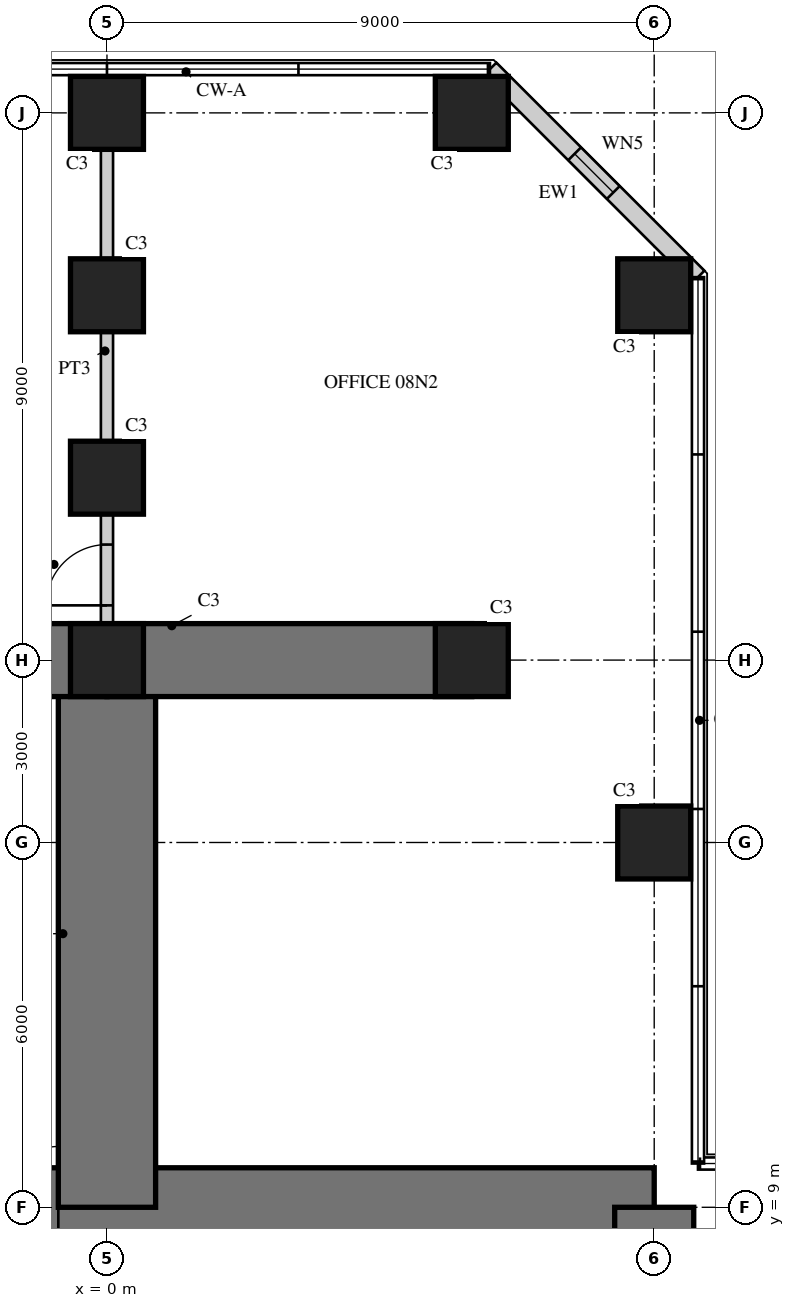
"""IFC4 building model, lengths in metres.
Left out: names, types, materials, properties, quantities, classifications, styles, units other than length and angle.
Written with IfcOpenShell. Run it as: python <this file> out.ifc"""

import sys

from ifc_helpers import new_model, si_unit, direction, frame, frame_2d, origin, origin_2d, place, context, subcontext, project, spatial, rectangle, hollow_rectangle, extrude, element, fill, save


model = new_model("IFC4")
c1 = context("Model", 3, precision=1e-05, world=origin(), true_north=direction((0.0, 1.0)))
c2 = subcontext(c1, "Body", "Model", "MODEL_VIEW")
j1 = project(units=[si_unit("LENGTHUNIT", "METRE"), si_unit("PLANEANGLEUNIT", "RADIAN")], contexts=[c1])
p1 = place(None, origin())
s1 = spatial("IfcSite", under=j1, at=p1, CompositionType="ELEMENT")
p2 = place(p1, origin())
s2 = spatial("IfcBuilding", under=s1, at=p2, CompositionType="ELEMENT")
p3 = place(p2, frame((0.0, 0.0, 35.5)))
s3 = spatial("IfcBuildingStorey", under=s2, at=p3, CompositionType="ELEMENT", Elevation=35.5)
p4 = place(p3, frame((9.0, 9.0, 0.0), z_axis=(0.0, 0.0, 1.0), x_axis=(-1.0, 0.0, 0.0)))
e1 = element("IfcWall", 1, at=p4, inside=s3, PredefinedType="SHEAR", context=c2, shape_type="SweptSolid", body=[
    extrude(rectangle(XDim=18.0, YDim=1.3, at=frame_2d((9.0, 0.0))), origin(), (0.0, 0.0, 1.0), 4.0),
])
p5 = place(p4, frame((9.8, 0.0, 0.0)))
e2 = element("IfcOpeningElement", 2, at=p5, cuts=e1, PredefinedType="OPENING", context=c2, shape_type="SweptSolid", body=[
    extrude(rectangle(XDim=1.0, YDim=2.4, at=frame_2d((0.5, 1.2))), frame((0.0, 0.66, 0.0), z_axis=(0.0, -1.0, 0.0), x_axis=(1.0, 0.0, 0.0)), (0.0, 0.0, 1.0), 1.32),
])
p6 = place(p3, frame((9.0, -9.0, 0.0), z_axis=(0.0, 0.0, 1.0), x_axis=(0.0, 1.0, 0.0)))
e3 = element("IfcWall", 3, at=p6, inside=s3, PredefinedType="SHEAR", context=c2, shape_type="SweptSolid", body=[
    extrude(rectangle(XDim=18.0, YDim=1.3, at=frame_2d((9.0, 0.0))), origin(), (0.0, 0.0, 1.0), 4.0),
])
p7 = place(p6, frame((9.8, 0.0, 0.0)))
e4 = element("IfcOpeningElement", 4, at=p7, cuts=e3, PredefinedType="OPENING", context=c2, shape_type="SweptSolid", body=[
    extrude(rectangle(XDim=1.0, YDim=2.4, at=frame_2d((0.5, 1.2))), frame((0.0, 0.66, 0.0), z_axis=(0.0, -1.0, 0.0), x_axis=(1.0, 0.0, 0.0)), (0.0, 0.0, 1.0), 1.32),
])
p8 = place(p3, frame((0.0, 9.0, 0.0), z_axis=(0.0, 0.0, 1.0), x_axis=(0.0, 1.0, 0.0)))
e5 = element("IfcWall", 5, at=p8, inside=s3, PredefinedType="SHEAR", context=c2, shape_type="SweptSolid", body=[
    extrude(rectangle(XDim=9.0, YDim=1.6, at=frame_2d((4.5, 0.0))), origin(), (0.0, 0.0, 1.0), 4.0),
])
for number, where, z_axis, x_axis in (
    (6, (0.0, 18.0, 0.0), (0.0, 0.0, 1.0), (-1.0, 0.0, 0.0)),
    (7, (0.0, 18.0, 0.0), (0.0, 0.0, 1.0), (1.0, 0.0, 0.0)),
):
    element("IfcWall", number, at=place(p3, frame(where, z_axis=z_axis, x_axis=x_axis)), inside=s3, PredefinedType="SHEAR", context=c2, shape_type="SweptSolid", body=[
        extrude(rectangle(XDim=6.0, YDim=1.2, at=frame_2d((3.0, 0.0))), origin(), (0.0, 0.0, 1.0), 4.0),
    ])
for number, where, z_axis, x_axis in (
    (8, (9.0, 15.0, 0.0), (0.0, 0.0, 1.0), (1.0, 0.0, 0.0)),
    (9, (9.0, 24.0, 0.0), (0.0, 0.0, 1.0), (1.0, 0.0, 0.0)),
    (10, (6.0, 27.0, 0.0), (0.0, 0.0, 1.0), (1.0, 0.0, 0.0)),
    (11, (0.0, 27.0, 0.0), (0.0, 0.0, 1.0), (1.0, 0.0, 0.0)),
    (12, (6.0, 18.0, 0.0), (0.0, 0.0, 1.0), (1.0, 0.0, 0.0)),
    (13, (0.0, 18.0, 0.0), (0.0, 0.0, 1.0), (1.0, 0.0, 0.0)),
    (14, (0.0, 21.0, 0.0), (0.0, 0.0, 1.0), (1.0, 0.0, 0.0)),
    (15, (0.0, 24.0, 0.0), (0.0, 0.0, 1.0), (1.0, 0.0, 0.0)),
):
    element("IfcColumn", number, at=place(p3, frame(where, z_axis=z_axis, x_axis=x_axis)), inside=s3, PredefinedType="COLUMN", context=c2, shape_type="SweptSolid", body=[
        extrude(rectangle(XDim=1.2, YDim=1.2, at=origin_2d()), origin(), (0.0, 0.0, 1.0), 4.0),
    ])
p9 = place(p3, frame((9.72, 24.298, 0.0), z_axis=(0.0, 0.0, 1.0), x_axis=(-0.707106781187, 0.707106781187, 0.0)))
e16 = element("IfcWall", 16, at=p9, inside=s3, PredefinedType="SOLIDWALL", context=c2, shape_type="SweptSolid", body=[
    extrude(rectangle(XDim=4.839, YDim=0.3, at=frame_2d((2.419, 0.0))), origin(), (0.0, 0.0, 1.0), 3.8),
])
p10 = place(p9, frame((1.969, 0.0, 0.3)))
e17 = element("IfcOpeningElement", 17, at=p10, cuts=e16, PredefinedType="OPENING", context=c2, shape_type="SweptSolid", body=[
    extrude(rectangle(XDim=0.9, YDim=2.4, at=frame_2d((0.45, 1.2))), frame((0.0, 0.16, 0.0), z_axis=(0.0, -1.0, 0.0), x_axis=(1.0, 0.0, 0.0)), (0.0, 0.0, 1.0), 0.32),
])
p11 = place(p3, frame((0.0, 18.0, 0.0), z_axis=(0.0, 0.0, 1.0), x_axis=(0.0, 1.0, 0.0)))
e18 = element("IfcWall", 18, at=p11, inside=s3, PredefinedType="SOLIDWALL", context=c2, shape_type="SweptSolid", body=[
    extrude(rectangle(XDim=3.0, YDim=0.2, at=frame_2d((1.5, 0.0))), origin(), (0.0, 0.0, 1.0), 3.8),
])
p12 = place(p11, frame((0.9, 0.0, 0.0)))
e19 = element("IfcOpeningElement", 19, at=p12, cuts=e18, PredefinedType="OPENING", context=c2, shape_type="SweptSolid", body=[
    extrude(rectangle(XDim=1.0, YDim=2.2, at=frame_2d((0.5, 1.1))), frame((0.0, 0.11, 0.0), z_axis=(0.0, -1.0, 0.0), x_axis=(1.0, 0.0, 0.0)), (0.0, 0.0, 1.0), 0.22),
])
p13 = place(p3, frame((0.0, 21.0, 0.0), z_axis=(0.0, 0.0, 1.0), x_axis=(0.0, 1.0, 0.0)))
e20 = element("IfcWall", 20, at=p13, inside=s3, PredefinedType="SOLIDWALL", context=c2, shape_type="SweptSolid", body=[
    extrude(rectangle(XDim=6.0, YDim=0.2, at=frame_2d((3.0, 0.0))), origin(), (0.0, 0.0, 1.0), 2.9),
])
p14 = place(p10, origin())
e21 = element("IfcWindow", 21, at=p14, inside=s3, PartitioningType="SINGLE_PANEL", PredefinedType="WINDOW", context=c2, shape_type="SweptSolid", body=[
    extrude(hollow_rectangle(XDim=0.9, YDim=2.4, WallThickness=0.06, at=frame_2d((0.45, 1.2))), frame((0.0, 0.03, 0.0), z_axis=(0.0, -1.0, 0.0), x_axis=(1.0, 0.0, 0.0)), (0.0, 0.0, 1.0), 0.06),
    extrude(rectangle(XDim=0.779, YDim=2.279, at=frame_2d((0.45, 1.2))), frame((0.0, 0.03, 0.0), z_axis=(0.0, -1.0, 0.0), x_axis=(1.0, 0.0, 0.0)), (0.0, 0.0, 1.0), 0.06),
])
fill(e17, e21)
p15 = place(p12, origin())
e22 = element("IfcDoor", 22, at=p15, inside=s3, OperationType="SINGLE_SWING_LEFT", PredefinedType="DOOR", context=c2, shape_type="SweptSolid", body=[
    extrude(rectangle(XDim=1.0, YDim=2.2, at=frame_2d((0.5, 1.1))), frame((0.0, 0.025, 0.0), z_axis=(0.0, -1.0, 0.0), x_axis=(1.0, 0.0, 0.0)), (0.0, 0.0, 1.0), 0.05),
])
fill(e19, e22)
p16 = place(p5, frame((1.0, 0.0, 0.0), z_axis=(0.0, 0.0, 1.0), x_axis=(-1.0, 0.0, 0.0)))
e23 = element("IfcDoor", 23, at=p16, inside=s3, OperationType="SINGLE_SWING_RIGHT", PredefinedType="DOOR", context=c2, shape_type="SweptSolid", body=[
    extrude(rectangle(XDim=1.0, YDim=2.4, at=frame_2d((0.5, 1.2))), frame((0.0, -0.005, 0.0), z_axis=(0.0, -1.0, 0.0), x_axis=(1.0, 0.0, 0.0)), (0.0, 0.0, 1.0), 0.05),
])
fill(e2, e23)
save(model, sys.argv[1])
